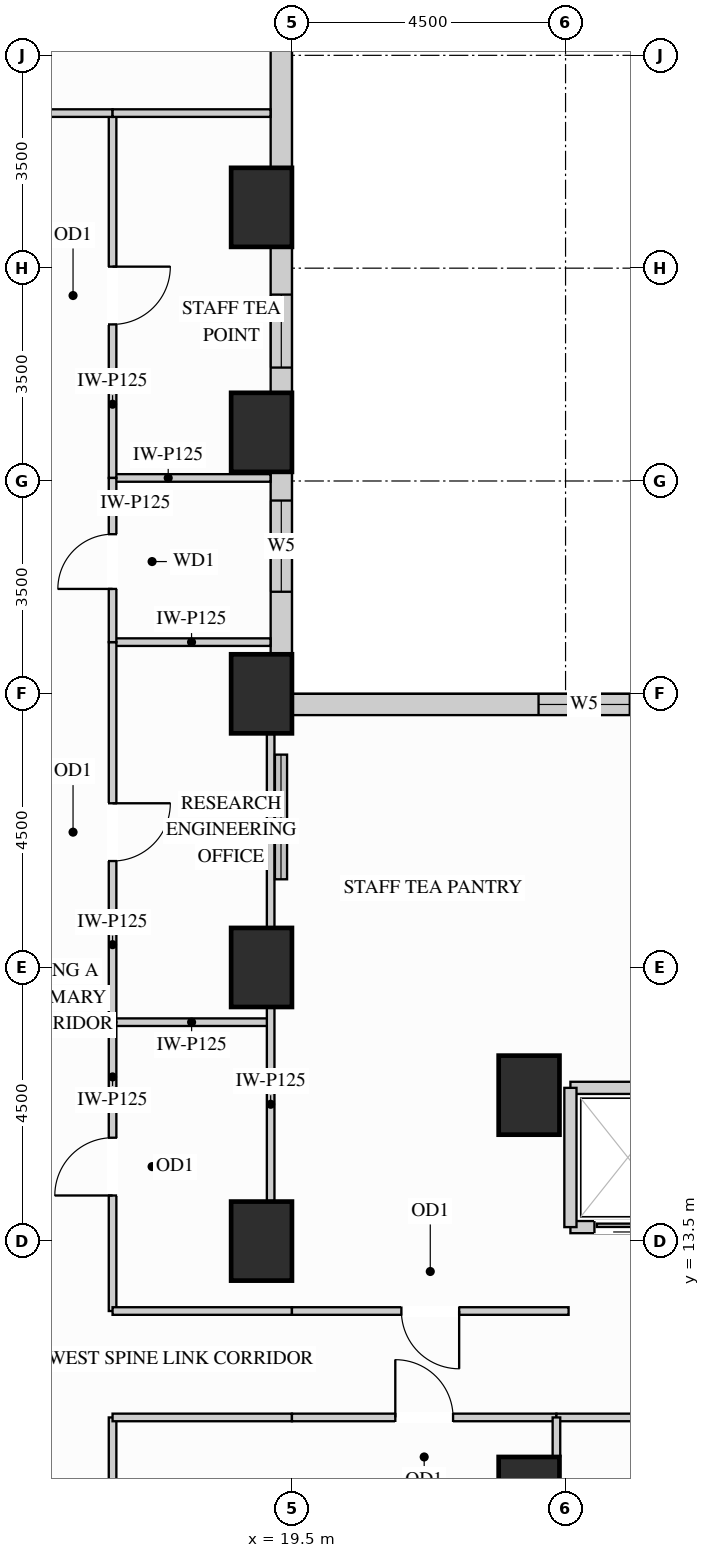
"""IFC4 building model, lengths in metres.
Left out: names, types, materials, properties, quantities, classifications, styles, units other than length and angle.
Written with IfcOpenShell. Run it as: python <this file> out.ifc"""

import sys

from ifc_helpers import new_model, si_unit, direction, frame, frame_2d, origin, origin_2d, place, context, subcontext, project, spatial, rectangle, extrude, source, transform, mapped, element, fill, save


model = new_model("IFC4")
c1 = context("Model", 3, precision=1e-05, world=origin(), true_north=direction((0.0, 1.0)))
c2 = subcontext(c1, "Body", "Model", "MODEL_VIEW")
j1 = project(units=[si_unit("LENGTHUNIT", "METRE"), si_unit("PLANEANGLEUNIT", "RADIAN")], contexts=[c1])
p1 = place(None, origin())
s1 = spatial("IfcSite", under=j1, at=p1, CompositionType="ELEMENT")
p2 = place(p1, origin())
s2 = spatial("IfcBuilding", under=s1, at=p2, CompositionType="ELEMENT")
p3 = place(p2, frame((0.0, 0.0, 36.9)))
s3 = spatial("IfcBuildingStorey", under=s2, at=p3, CompositionType="ELEMENT", Elevation=36.9)
m1 = source(origin(), c2, "Body", "SweptSolid", [
    extrude(rectangle(XDim=1.0, YDim=1.3, at=origin_2d()), origin(), (0.0, 0.0, 1.0), 3.38),
])
for number, where, z_axis, x_axis in (
    (1, (19.0, 13.5, 0.0), (0.0, 0.0, 1.0), (1.0, 0.0, 0.0)),
    (2, (19.0, 18.0, 0.0), (0.0, 0.0, 1.0), (1.0, 0.0, 0.0)),
    (3, (19.0, 22.5, 0.0), (0.0, 0.0, 1.0), (1.0, 0.0, 0.0)),
    (4, (19.0, 26.8, 0.0), (0.0, 0.0, 1.0), (1.0, 0.0, 0.0)),
    (5, (19.0, 30.5, 0.0), (0.0, 0.0, 1.0), (1.0, 0.0, 0.0)),
    (6, (23.4, 15.9, 0.0), (0.0, 0.0, 1.0), (1.0, 0.0, 0.0)),
    (7, (23.4, 9.3, 0.0), (0.0, 0.0, 1.0), (1.0, 0.0, 0.0)),
):
    element("IfcColumn", number, at=place(p3, frame(where, z_axis=z_axis, x_axis=x_axis)), inside=s3, PredefinedType="COLUMN", context=c2, shape_type="MappedRepresentation", body=[
        mapped(m1, transform((0.0, 0.0, 0.0), x_axis=(1.0, 0.0, 0.0), y_axis=(0.0, 1.0, 0.0), z_axis=(0.0, 0.0, 1.0))),
    ])
p4 = place(p3, frame((34.352, 22.325, 0.0), z_axis=(0.0, 0.0, 1.0), x_axis=(-1.0, 0.0, 0.0)))
e8 = element("IfcWall", 8, at=p4, inside=s3, PredefinedType="SOLIDWALL", context=c2, shape_type="SweptSolid", body=[
    extrude(rectangle(XDim=14.854, YDim=0.35, at=frame_2d((7.427, 0.0))), origin(), (0.0, 0.0, 1.0), 3.365),
])
p5 = place(p4, frame((4.058, 0.0, 0.78)))
e9 = element("IfcOpeningElement", 9, at=p5, cuts=e8, PredefinedType="OPENING", context=c2, shape_type="SweptSolid", body=[
    extrude(rectangle(XDim=1.5, YDim=2.0, at=frame_2d((0.75, 1.0))), frame((0.0, 0.185, 0.0), z_axis=(0.0, -1.0, 0.0), x_axis=(1.0, 0.0, 0.0)), (0.0, 0.0, 1.0), 0.37),
])
p6 = place(p4, frame((9.296, 0.0, 0.78)))
e10 = element("IfcOpeningElement", 10, at=p6, cuts=e8, PredefinedType="OPENING", context=c2, shape_type="SweptSolid", body=[
    extrude(rectangle(XDim=1.5, YDim=2.0, at=frame_2d((0.75, 1.0))), frame((0.0, 0.185, 0.0), z_axis=(0.0, -1.0, 0.0), x_axis=(1.0, 0.0, 0.0)), (0.0, 0.0, 1.0), 0.37),
])
p7 = place(p3, frame((19.325, 23.148, 0.0), z_axis=(0.0, 0.0, 1.0), x_axis=(0.0, 1.0, 0.0)))
e11 = element("IfcWall", 11, at=p7, inside=s3, PredefinedType="SOLIDWALL", context=c2, shape_type="SweptSolid", body=[
    extrude(rectangle(XDim=3.004, YDim=0.35, at=frame_2d((1.502, 0.0))), origin(), (0.0, 0.0, 1.0), 2.51),
])
p8 = place(p7, frame((1.031, 0.0, 0.78)))
e12 = element("IfcOpeningElement", 12, at=p8, cuts=e11, PredefinedType="OPENING", context=c2, shape_type="SweptSolid", body=[
    extrude(rectangle(XDim=1.5, YDim=1.55, at=frame_2d((0.75, 0.775))), frame((0.0, 0.185, 0.0), z_axis=(0.0, -1.0, 0.0), x_axis=(1.0, 0.0, 0.0)), (0.0, 0.0, 1.0), 0.37),
])
p9 = place(p3, frame((19.325, 27.448, 0.0), z_axis=(0.0, 0.0, 1.0), x_axis=(0.0, 1.0, 0.0)))
e13 = element("IfcWall", 13, at=p9, inside=s3, PredefinedType="SOLIDWALL", context=c2, shape_type="SweptSolid", body=[
    extrude(rectangle(XDim=2.404, YDim=0.35, at=frame_2d((1.202, 0.0))), origin(), (0.0, 0.0, 1.0), 2.51),
])
p10 = place(p9, frame((0.417, 0.0, 0.78)))
e14 = element("IfcOpeningElement", 14, at=p10, cuts=e13, PredefinedType="OPENING", context=c2, shape_type="SweptSolid", body=[
    extrude(rectangle(XDim=1.2, YDim=1.55, at=frame_2d((0.6, 0.775))), frame((0.0, 0.185, 0.0), z_axis=(0.0, -1.0, 0.0), x_axis=(1.0, 0.0, 0.0)), (0.0, 0.0, 1.0), 0.37),
])
m2 = source(origin(), c2, "Body", "SweptSolid", [
    extrude(rectangle(XDim=3.204, YDim=0.35, at=frame_2d((1.602, 0.0))), origin(), (0.0, 0.0, 1.0), 2.51),
])
p11 = place(p3, frame((19.325, 31.148, 0.0), z_axis=(0.0, 0.0, 1.0), x_axis=(0.0, 1.0, 0.0)))
e15 = element("IfcWall", 15, at=p11, inside=s3, PredefinedType="SOLIDWALL", context=c2, shape_type="MappedRepresentation", body=[
    mapped(m2, transform((0.0, 0.0, 0.0), x_axis=(1.0, 0.0, 0.0), y_axis=(0.0, 1.0, 0.0), z_axis=(0.0, 0.0, 1.0))),
])
m3 = source(origin(), c2, "Body", "SweptSolid", [
    extrude(rectangle(XDim=2.6, YDim=0.125, at=frame_2d((1.3, 0.0))), origin(), (0.0, 0.0, 1.0), 3.365),
])
p12 = place(p3, frame((16.55, 17.1, 0.0), z_axis=(0.0, 0.0, 1.0), x_axis=(1.0, 0.0, 0.0)))
e16 = element("IfcWall", 16, at=p12, inside=s3, PredefinedType="PARTITIONING", context=c2, shape_type="MappedRepresentation", body=[
    mapped(m3, transform((0.0, 0.0, 0.0), x_axis=(1.0, 0.0, 0.0), y_axis=(0.0, 1.0, 0.0), z_axis=(0.0, 0.0, 1.0))),
])
m4 = source(origin(), c2, "Body", "SweptSolid", [
    extrude(rectangle(XDim=2.598, YDim=0.125, at=frame_2d((1.299, 0.0))), origin(), (0.0, 0.0, 1.0), 3.365),
])
for number, where, z_axis, x_axis in (
    (17, (16.55, 23.35, 0.0), (0.0, 0.0, 1.0), (1.0, 0.0, 0.0)),
    (18, (16.55, 26.05, 0.0), (0.0, 0.0, 1.0), (1.0, 0.0, 0.0)),
):
    element("IfcWall", number, at=place(p3, frame(where, z_axis=z_axis, x_axis=x_axis)), inside=s3, PredefinedType="PARTITIONING", context=c2, shape_type="MappedRepresentation", body=[
        mapped(m4, transform((0.0, 0.0, 0.0), x_axis=(1.0, 0.0, 0.0), y_axis=(0.0, 1.0, 0.0), z_axis=(0.0, 0.0, 1.0))),
    ])
m5 = source(origin(), c2, "Body", "SweptSolid", [
    extrude(rectangle(XDim=3.18, YDim=0.125, at=frame_2d((1.59, 0.0))), origin(), (0.0, 0.0, 1.0), 2.67),
])
for number, where, z_axis, x_axis in (
    (19, (19.15, 14.16, 0.0), (0.0, 0.0, 1.0), (0.0, 1.0, 0.0)),
    (20, (19.15, 18.66, 0.0), (0.0, 0.0, 1.0), (0.0, 1.0, 0.0)),
):
    element("IfcWall", number, at=place(p3, frame(where, z_axis=z_axis, x_axis=x_axis)), inside=s3, PredefinedType="PARTITIONING", context=c2, shape_type="MappedRepresentation", body=[
        mapped(m5, transform((0.0, 0.0, 0.0), x_axis=(1.0, 0.0, 0.0), y_axis=(0.0, 1.0, 0.0), z_axis=(0.0, 0.0, 1.0))),
    ])
p13 = place(p3, frame((16.55, 12.35, 0.0), z_axis=(0.0, 0.0, 1.0), x_axis=(0.0, 1.0, 0.0)))
e21 = element("IfcWall", 21, at=p13, inside=s3, PredefinedType="PARTITIONING", context=c2, shape_type="SweptSolid", body=[
    extrude(rectangle(XDim=4.75, YDim=0.125, at=frame_2d((2.375, 0.0))), origin(), (0.0, 0.0, 1.0), 3.365),
])
p14 = place(p13, frame((1.9, 0.0, 0.0)))
e22 = element("IfcOpeningElement", 22, at=p14, cuts=e21, PredefinedType="OPENING", context=c2, shape_type="SweptSolid", body=[
    extrude(rectangle(XDim=0.95, YDim=2.15, at=frame_2d((0.475, 1.075))), frame((0.0, 0.073, 0.0), z_axis=(0.0, -1.0, 0.0), x_axis=(1.0, 0.0, 0.0)), (0.0, 0.0, 1.0), 0.145),
])
p15 = place(p3, frame((16.55, 17.1, 0.0), z_axis=(0.0, 0.0, 1.0), x_axis=(0.0, 1.0, 0.0)))
e23 = element("IfcWall", 23, at=p15, inside=s3, PredefinedType="PARTITIONING", context=c2, shape_type="SweptSolid", body=[
    extrude(rectangle(XDim=6.25, YDim=0.125, at=frame_2d((3.125, 0.0))), origin(), (0.0, 0.0, 1.0), 3.365),
])
p16 = place(p15, frame((2.65, 0.0, 0.0)))
e24 = element("IfcOpeningElement", 24, at=p16, cuts=e23, PredefinedType="OPENING", context=c2, shape_type="SweptSolid", body=[
    extrude(rectangle(XDim=0.95, YDim=2.15, at=frame_2d((0.475, 1.075))), frame((0.0, 0.073, 0.0), z_axis=(0.0, -1.0, 0.0), x_axis=(1.0, 0.0, 0.0)), (0.0, 0.0, 1.0), 0.145),
])
p17 = place(p3, frame((16.55, 26.05, 0.0), z_axis=(0.0, 0.0, 1.0), x_axis=(0.0, 1.0, 0.0)))
e25 = element("IfcWall", 25, at=p17, inside=s3, PredefinedType="PARTITIONING", context=c2, shape_type="SweptSolid", body=[
    extrude(rectangle(XDim=6.0, YDim=0.125, at=frame_2d((3.0, 0.0))), origin(), (0.0, 0.0, 1.0), 3.365),
])
p18 = place(p17, frame((2.525, 0.0, 0.0)))
e26 = element("IfcOpeningElement", 26, at=p18, cuts=e25, PredefinedType="OPENING", context=c2, shape_type="SweptSolid", body=[
    extrude(rectangle(XDim=0.95, YDim=2.15, at=frame_2d((0.475, 1.075))), frame((0.0, 0.073, 0.0), z_axis=(0.0, -1.0, 0.0), x_axis=(1.0, 0.0, 0.0)), (0.0, 0.0, 1.0), 0.145),
])
p19 = place(p3, frame((16.55, 5.65, 0.0), z_axis=(0.0, 0.0, 1.0), x_axis=(0.0, 1.0, 0.0)))
e27 = element("IfcWall", 27, at=p19, inside=s3, PredefinedType="PARTITIONING", context=c2, shape_type="SweptSolid", body=[
    extrude(rectangle(XDim=4.95, YDim=0.125, at=frame_2d((2.475, 0.0))), origin(), (0.0, 0.0, 1.0), 3.365),
])
p20 = place(p19, frame((2.0, 0.0, 0.0)))
e28 = element("IfcOpeningElement", 28, at=p20, cuts=e27, PredefinedType="OPENING", context=c2, shape_type="SweptSolid", body=[
    extrude(rectangle(XDim=0.95, YDim=2.15, at=frame_2d((0.475, 1.075))), frame((0.0, 0.073, 0.0), z_axis=(0.0, -1.0, 0.0), x_axis=(1.0, 0.0, 0.0)), (0.0, 0.0, 1.0), 0.145),
])
p21 = place(p3, frame((16.55, 23.35, 0.0), z_axis=(0.0, 0.0, 1.0), x_axis=(0.0, 1.0, 0.0)))
e29 = element("IfcWall", 29, at=p21, inside=s3, PredefinedType="PARTITIONING", context=c2, shape_type="SweptSolid", body=[
    extrude(rectangle(XDim=2.7, YDim=0.125, at=frame_2d((1.35, 0.0))), origin(), (0.0, 0.0, 1.0), 3.365),
])
p22 = place(p21, frame((0.875, 0.0, 0.0)))
e30 = element("IfcOpeningElement", 30, at=p22, cuts=e29, PredefinedType="OPENING", context=c2, shape_type="SweptSolid", body=[
    extrude(rectangle(XDim=0.9, YDim=2.15, at=frame_2d((0.45, 1.075))), frame((0.0, 0.073, 0.0), z_axis=(0.0, -1.0, 0.0), x_axis=(1.0, 0.0, 0.0)), (0.0, 0.0, 1.0), 0.145),
])
p23 = place(p3, frame((11.916, 32.05, 0.0), z_axis=(0.0, 0.0, 1.0), x_axis=(1.0, 0.0, 0.0)))
e31 = element("IfcWall", 31, at=p23, inside=s3, PredefinedType="PARTITIONING", context=c2, shape_type="SweptSolid", body=[
    extrude(rectangle(XDim=4.634, YDim=0.125, at=frame_2d((2.317, 0.0))), origin(), (0.0, 0.0, 1.0), 3.365),
])
p24 = place(p23, frame((1.842, 0.0, 0.0)))
e32 = element("IfcOpeningElement", 32, at=p24, cuts=e31, PredefinedType="OPENING", context=c2, shape_type="SweptSolid", body=[
    extrude(rectangle(XDim=0.95, YDim=2.15, at=frame_2d((0.475, 1.075))), frame((0.0, 0.073, 0.0), z_axis=(0.0, -1.0, 0.0), x_axis=(1.0, 0.0, 0.0)), (0.0, 0.0, 1.0), 0.145),
])
p25 = place(p3, frame((16.55, 32.05, 0.0), z_axis=(0.0, 0.0, 1.0), x_axis=(1.0, 0.0, 0.0)))
e33 = element("IfcWall", 33, at=p25, inside=s3, PredefinedType="PARTITIONING", context=c2, shape_type="MappedRepresentation", body=[
    mapped(m4, transform((0.0, 0.0, 0.0), x_axis=(1.0, 0.0, 0.0), y_axis=(0.0, 1.0, 0.0), z_axis=(0.0, 0.0, 1.0))),
])
m6 = source(origin(), c2, "Body", "SweptSolid", [
    extrude(rectangle(XDim=2.95, YDim=0.125, at=frame_2d((1.475, 0.0))), origin(), (0.0, 0.0, 1.0), 3.365),
])
p26 = place(p3, frame((16.55, 12.35, 0.0), z_axis=(0.0, 0.0, 1.0), x_axis=(1.0, 0.0, 0.0)))
e34 = element("IfcWall", 34, at=p26, inside=s3, PredefinedType="PARTITIONING", context=c2, shape_type="MappedRepresentation", body=[
    mapped(m6, transform((0.0, 0.0, 0.0), x_axis=(1.0, 0.0, 0.0), y_axis=(0.0, 1.0, 0.0), z_axis=(0.0, 0.0, 1.0))),
])
p27 = place(p3, frame((19.5, 12.35, 0.0), z_axis=(0.0, 0.0, 1.0), x_axis=(1.0, 0.0, 0.0)))
e35 = element("IfcWall", 35, at=p27, inside=s3, PredefinedType="PARTITIONING", context=c2, shape_type="SweptSolid", body=[
    extrude(rectangle(XDim=4.55, YDim=0.125, at=frame_2d((2.275, 0.0))), origin(), (0.0, 0.0, 1.0), 3.365),
])
p28 = place(p27, frame((1.8, 0.0, 0.0)))
e36 = element("IfcOpeningElement", 36, at=p28, cuts=e35, PredefinedType="OPENING", context=c2, shape_type="SweptSolid", body=[
    extrude(rectangle(XDim=0.95, YDim=2.15, at=frame_2d((0.475, 1.075))), frame((0.0, 0.073, 0.0), z_axis=(0.0, -1.0, 0.0), x_axis=(1.0, 0.0, 0.0)), (0.0, 0.0, 1.0), 0.145),
])
p29 = place(p3, frame((16.55, 10.6, 0.0), z_axis=(0.0, 0.0, 1.0), x_axis=(1.0, 0.0, 0.0)))
e37 = element("IfcWall", 37, at=p29, inside=s3, PredefinedType="PARTITIONING", context=c2, shape_type="MappedRepresentation", body=[
    mapped(m6, transform((0.0, 0.0, 0.0), x_axis=(1.0, 0.0, 0.0), y_axis=(0.0, 1.0, 0.0), z_axis=(0.0, 0.0, 1.0))),
])
p30 = place(p3, frame((19.5, 10.6, 0.0), z_axis=(0.0, 0.0, 1.0), x_axis=(1.0, 0.0, 0.0)))
e38 = element("IfcWall", 38, at=p30, inside=s3, PredefinedType="PARTITIONING", context=c2, shape_type="SweptSolid", body=[
    extrude(rectangle(XDim=4.35, YDim=0.125, at=frame_2d((2.175, 0.0))), origin(), (0.0, 0.0, 1.0), 3.365),
])
p31 = place(p30, frame((1.7, 0.0, 0.0)))
e39 = element("IfcOpeningElement", 39, at=p31, cuts=e38, PredefinedType="OPENING", context=c2, shape_type="SweptSolid", body=[
    extrude(rectangle(XDim=0.95, YDim=2.15, at=frame_2d((0.475, 1.075))), frame((0.0, 0.073, 0.0), z_axis=(0.0, -1.0, 0.0), x_axis=(1.0, 0.0, 0.0)), (0.0, 0.0, 1.0), 0.145),
])
p32 = place(p3, frame((23.85, 10.6, 0.0), z_axis=(0.0, 0.0, 1.0), x_axis=(1.0, 0.0, 0.0)))
e40 = element("IfcWall", 40, at=p32, inside=s3, PredefinedType="PARTITIONING", context=c2, shape_type="SweptSolid", body=[
    extrude(rectangle(XDim=6.0, YDim=0.125, at=frame_2d((3.0, 0.0))), origin(), (0.0, 0.0, 1.0), 3.365),
])
p33 = place(p32, frame((2.525, 0.0, 0.0)))
e41 = element("IfcOpeningElement", 41, at=p33, cuts=e40, PredefinedType="OPENING", context=c2, shape_type="SweptSolid", body=[
    extrude(rectangle(XDim=0.95, YDim=2.15, at=frame_2d((0.475, 1.075))), frame((0.0, 0.073, 0.0), z_axis=(0.0, -1.0, 0.0), x_axis=(1.0, 0.0, 0.0)), (0.0, 0.0, 1.0), 0.145),
])
m7 = source(origin(), c2, "Body", "SweptSolid", [
    extrude(rectangle(XDim=0.64, YDim=0.125, at=frame_2d((0.32, 0.0))), origin(), (0.0, 0.0, 1.0), 3.365),
])
p34 = place(p3, frame((23.85, 9.96, 0.0), z_axis=(0.0, 0.0, 1.0), x_axis=(0.0, 1.0, 0.0)))
e42 = element("IfcWall", 42, at=p34, inside=s3, PredefinedType="PARTITIONING", context=c2, shape_type="MappedRepresentation", body=[
    mapped(m7, transform((0.0, 0.0, 0.0), x_axis=(1.0, 0.0, 0.0), y_axis=(0.0, 1.0, 0.0), z_axis=(0.0, 0.0, 1.0))),
])
m8 = source(origin(), c2, "Body", "SweptSolid", [
    extrude(rectangle(XDim=1.89, YDim=0.2, at=frame_2d((0.945, 0.0))), origin(), (0.0, 0.0, 1.0), 2.67),
])
p35 = place(p3, frame((24.08, 16.02, 0.0), z_axis=(0.0, 0.0, 1.0), x_axis=(1.0, 0.0, 0.0)))
e43 = element("IfcWall", 43, at=p35, inside=s3, PredefinedType="PARTITIONING", context=c2, shape_type="MappedRepresentation", body=[
    mapped(m8, transform((0.0, 0.0, 0.0), x_axis=(1.0, 0.0, 0.0), y_axis=(0.0, 1.0, 0.0), z_axis=(0.0, 0.0, 1.0))),
])
p36 = place(p3, frame((24.08, 13.73, 0.0), z_axis=(0.0, 0.0, 1.0), x_axis=(1.0, 0.0, 0.0)))
e44 = element("IfcWall", 44, at=p36, inside=s3, PredefinedType="PARTITIONING", context=c2, shape_type="SweptSolid", body=[
    extrude(rectangle(XDim=1.89, YDim=0.2, at=frame_2d((0.945, 0.0))), origin(), (0.0, 0.0, 1.0), 2.446),
])
p37 = place(p36, frame((0.395, 0.0, 0.0)))
e45 = element("IfcOpeningElement", 45, at=p37, cuts=e44, PredefinedType="OPENING", context=c2, shape_type="SweptSolid", body=[
    extrude(rectangle(XDim=1.1, YDim=2.2, at=frame_2d((0.55, 1.1))), frame((0.0, 0.11, 0.0), z_axis=(0.0, -1.0, 0.0), x_axis=(1.0, 0.0, 0.0)), (0.0, 0.0, 1.0), 0.22),
])
m9 = source(origin(), c2, "Body", "SweptSolid", [
    extrude(rectangle(XDim=2.29, YDim=0.2, at=frame_2d((1.145, 0.0))), origin(), (0.0, 0.0, 1.0), 3.365),
])
p38 = place(p3, frame((24.08, 13.73, 0.0), z_axis=(0.0, 0.0, 1.0), x_axis=(0.0, 1.0, 0.0)))
e46 = element("IfcWall", 46, at=p38, inside=s3, PredefinedType="PARTITIONING", context=c2, shape_type="MappedRepresentation", body=[
    mapped(m9, transform((0.0, 0.0, 0.0), x_axis=(1.0, 0.0, 0.0), y_axis=(0.0, 1.0, 0.0), z_axis=(0.0, 0.0, 1.0))),
])
m10 = source(origin(), c2, "Body", "SweptSolid", [
    extrude(rectangle(XDim=1.1, YDim=2.2, at=frame_2d((0.55, 1.1))), frame((0.0, 0.025, 0.0), z_axis=(0.0, -1.0, 0.0), x_axis=(1.0, 0.0, 0.0)), (0.0, 0.0, 1.0), 0.05),
])
p39 = place(p37, origin())
e47 = element("IfcDoor", 47, at=p39, inside=s3, OperationType="SLIDING_TO_LEFT", PredefinedType="DOOR", context=c2, shape_type="MappedRepresentation", body=[
    mapped(m10, transform((0.0, 0.0, 0.0), x_axis=(1.0, 0.0, 0.0), y_axis=(0.0, 1.0, 0.0), z_axis=(0.0, 0.0, 1.0))),
])
fill(e45, e47)
m11 = source(origin(), c2, "Body", "SweptSolid", [
    extrude(rectangle(XDim=0.95, YDim=2.15, at=frame_2d((0.475, 1.075))), frame((0.0, 0.025, 0.0), z_axis=(0.0, -1.0, 0.0), x_axis=(1.0, 0.0, 0.0)), (0.0, 0.0, 1.0), 0.05),
])
p40 = place(p14, origin())
e48 = element("IfcDoor", 48, at=p40, inside=s3, OperationType="SINGLE_SWING_LEFT", PredefinedType="DOOR", context=c2, shape_type="MappedRepresentation", body=[
    mapped(m11, transform((0.0, 0.0, 0.0), x_axis=(1.0, 0.0, 0.0), y_axis=(0.0, 1.0, 0.0), z_axis=(0.0, 0.0, 1.0))),
])
fill(e22, e48)
p41 = place(p16, origin())
e49 = element("IfcDoor", 49, at=p41, inside=s3, OperationType="SINGLE_SWING_RIGHT", PredefinedType="DOOR", context=c2, shape_type="MappedRepresentation", body=[
    mapped(m11, transform((0.0, 0.0, 0.0), x_axis=(1.0, 0.0, 0.0), y_axis=(0.0, 1.0, 0.0), z_axis=(0.0, 0.0, 1.0))),
])
fill(e24, e49)
p42 = place(p18, origin())
e50 = element("IfcDoor", 50, at=p42, inside=s3, OperationType="SINGLE_SWING_RIGHT", PredefinedType="DOOR", context=c2, shape_type="MappedRepresentation", body=[
    mapped(m11, transform((0.0, 0.0, 0.0), x_axis=(1.0, 0.0, 0.0), y_axis=(0.0, 1.0, 0.0), z_axis=(0.0, 0.0, 1.0))),
])
fill(e26, e50)
p43 = place(p28, origin())
e51 = element("IfcDoor", 51, at=p43, inside=s3, OperationType="SINGLE_SWING_RIGHT", PredefinedType="DOOR", context=c2, shape_type="MappedRepresentation", body=[
    mapped(m11, transform((0.0, 0.0, 0.0), x_axis=(1.0, 0.0, 0.0), y_axis=(0.0, 1.0, 0.0), z_axis=(0.0, 0.0, 1.0))),
])
fill(e36, e51)
p44 = place(p31, origin())
e52 = element("IfcDoor", 52, at=p44, inside=s3, OperationType="SINGLE_SWING_LEFT", PredefinedType="DOOR", context=c2, shape_type="MappedRepresentation", body=[
    mapped(m11, transform((0.0, 0.0, 0.0), x_axis=(1.0, 0.0, 0.0), y_axis=(0.0, 1.0, 0.0), z_axis=(0.0, 0.0, 1.0))),
])
fill(e39, e52)
m12 = source(origin(), c2, "Body", "SweptSolid", [
    extrude(rectangle(XDim=0.9, YDim=2.15, at=frame_2d((0.45, 1.075))), frame((0.0, 0.025, 0.0), z_axis=(0.0, -1.0, 0.0), x_axis=(1.0, 0.0, 0.0)), (0.0, 0.0, 1.0), 0.05),
])
p45 = place(p22, origin())
e53 = element("IfcDoor", 53, at=p45, inside=s3, OperationType="SINGLE_SWING_LEFT", PredefinedType="DOOR", context=c2, shape_type="MappedRepresentation", body=[
    mapped(m12, transform((0.0, 0.0, 0.0), x_axis=(1.0, 0.0, 0.0), y_axis=(0.0, 1.0, 0.0), z_axis=(0.0, 0.0, 1.0))),
])
fill(e30, e53)
m13 = source(origin(), c2, "Body", "SweptSolid", [
    extrude(rectangle(XDim=1.2, YDim=1.55, at=frame_2d((0.6, 0.775))), frame((0.0, 0.03, 0.0), z_axis=(0.0, -1.0, 0.0), x_axis=(1.0, 0.0, 0.0)), (0.0, 0.0, 1.0), 0.06),
])
p46 = place(p10, origin())
e54 = element("IfcWindow", 54, at=p46, inside=s3, PartitioningType="SINGLE_PANEL", PredefinedType="WINDOW", context=c2, shape_type="MappedRepresentation", body=[
    mapped(m13, transform((0.0, 0.0, 0.0), x_axis=(1.0, 0.0, 0.0), y_axis=(0.0, 1.0, 0.0), z_axis=(0.0, 0.0, 1.0))),
])
fill(e14, e54)
m14 = source(origin(), c2, "Body", "SweptSolid", [
    extrude(rectangle(XDim=1.5, YDim=2.0, at=frame_2d((0.75, 1.0))), frame((0.0, 0.03, 0.0), z_axis=(0.0, -1.0, 0.0), x_axis=(1.0, 0.0, 0.0)), (0.0, 0.0, 1.0), 0.06),
])
p47 = place(p6, origin())
e55 = element("IfcWindow", 55, at=p47, inside=s3, PartitioningType="SINGLE_PANEL", PredefinedType="WINDOW", context=c2, shape_type="MappedRepresentation", body=[
    mapped(m14, transform((0.0, 0.0, 0.0), x_axis=(1.0, 0.0, 0.0), y_axis=(0.0, 1.0, 0.0), z_axis=(0.0, 0.0, 1.0))),
])
fill(e10, e55)
m15 = source(origin(), c2, "Body", "SweptSolid", [
    extrude(rectangle(XDim=1.5, YDim=1.55, at=frame_2d((0.75, 0.775))), frame((0.0, 0.03, 0.0), z_axis=(0.0, -1.0, 0.0), x_axis=(1.0, 0.0, 0.0)), (0.0, 0.0, 1.0), 0.06),
])
p48 = place(p8, origin())
e56 = element("IfcWindow", 56, at=p48, inside=s3, PartitioningType="SINGLE_PANEL", PredefinedType="WINDOW", context=c2, shape_type="MappedRepresentation", body=[
    mapped(m15, transform((0.0, 0.0, 0.0), x_axis=(1.0, 0.0, 0.0), y_axis=(0.0, 1.0, 0.0), z_axis=(0.0, 0.0, 1.0))),
])
fill(e12, e56)
save(model, sys.argv[1])
